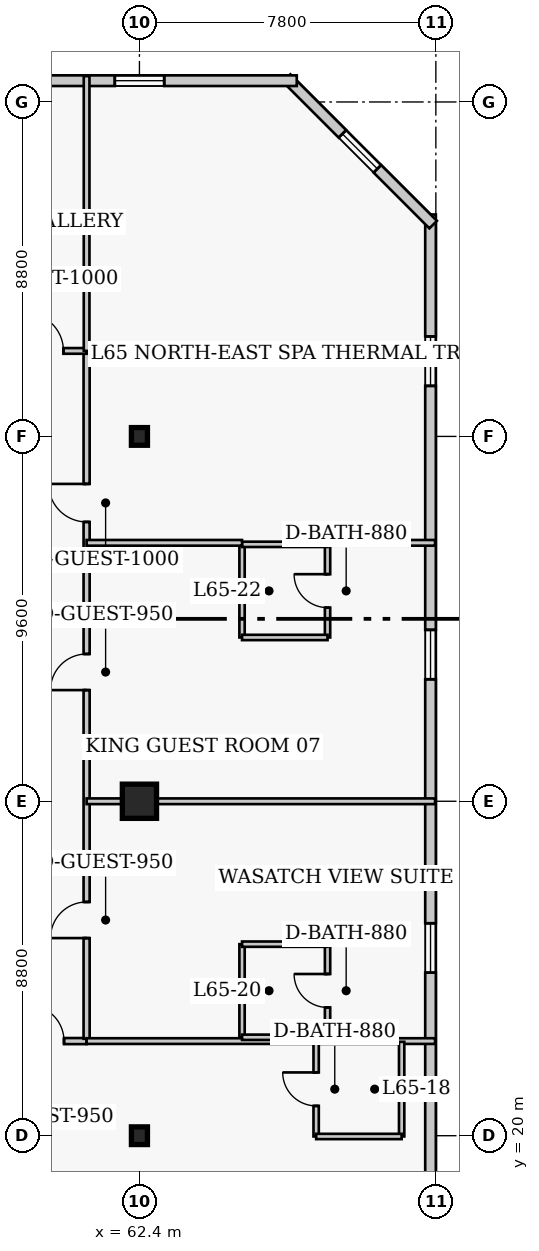
"""IFC4 building model, lengths in metres.
Left out: names, types, materials, properties, quantities, classifications, styles, units other than length and angle.
Written with IfcOpenShell. Run it as: python <this file> out.ifc"""

import sys

from ifc_helpers import new_model, si_unit, direction, frame, frame_2d, origin, origin_2d, place, context, subcontext, project, spatial, rectangle, i_section, extrude, element, fill, save


model = new_model("IFC4")
c1 = context("Model", 3, precision=1e-05, world=origin(), true_north=direction((0.0, 1.0)))
c2 = subcontext(c1, "Body", "Model", "MODEL_VIEW")
j1 = project(units=[si_unit("LENGTHUNIT", "METRE"), si_unit("PLANEANGLEUNIT", "RADIAN")], contexts=[c1])
p1 = place(None, origin())
s1 = spatial("IfcSite", under=j1, at=p1, CompositionType="ELEMENT")
p2 = place(p1, origin())
s2 = spatial("IfcBuilding", under=s1, at=p2, CompositionType="ELEMENT")
p3 = place(p2, frame((0.0, 0.0, 261.4)))
s3 = spatial("IfcBuildingStorey", under=s2, at=p3, CompositionType="ELEMENT", Elevation=261.4)
p4 = place(p3, frame((62.4, 20.0, 0.0), z_axis=(0.0, 0.0, 1.0), x_axis=(1.0, 0.0, 0.0)))
e1 = element("IfcColumn", 1, at=p4, inside=s3, PredefinedType="COLUMN", context=c2, shape_type="SweptSolid", body=[
    extrude(i_section(OverallWidth=0.422, OverallDepth=0.465, WebThickness=0.045, FlangeThickness=0.073, FilletRadius=0.017, at=origin_2d()), origin(), (0.0, 0.0, 1.0), 4.0),
])
p5 = place(p3, frame((62.4, 28.8, 0.0), z_axis=(0.0, 0.0, 1.0), x_axis=(1.0, 0.0, 0.0)))
e2 = element("IfcColumn", 2, at=p5, inside=s3, PredefinedType="COLUMN", context=c2, shape_type="SweptSolid", body=[
    extrude(rectangle(XDim=0.9, YDim=0.9, at=origin_2d()), origin(), (0.0, 0.0, 1.0), 4.0),
])
p6 = place(p3, frame((62.4, 38.4, 0.0), z_axis=(0.0, 0.0, 1.0), x_axis=(1.0, 0.0, 0.0)))
e3 = element("IfcColumn", 3, at=p6, inside=s3, PredefinedType="COLUMN", context=c2, shape_type="SweptSolid", body=[
    extrude(i_section(OverallWidth=0.422, OverallDepth=0.465, WebThickness=0.045, FlangeThickness=0.073, FilletRadius=0.017, at=origin_2d()), origin(), (0.0, 0.0, 1.0), 4.0),
])
p7 = place(p3, frame((70.06, 13.36, 0.0), z_axis=(0.0, 0.0, 1.0), x_axis=(0.0, 1.0, 0.0)))
e4 = element("IfcWall", 4, at=p7, inside=s3, PredefinedType="SOLIDWALL", context=c2, shape_type="SweptSolid", body=[
    extrude(rectangle(XDim=30.88, YDim=0.28, at=frame_2d((15.44, 0.0))), origin(), (0.0, 0.0, 1.0), 3.76),
])
p8 = place(p7, frame((3.21, 0.0, 0.85)))
e5 = element("IfcOpeningElement", 5, at=p8, cuts=e4, PredefinedType="OPENING", context=c2, shape_type="SweptSolid", body=[
    extrude(rectangle(XDim=1.3, YDim=1.7, at=frame_2d((0.65, 0.85))), frame((0.0, 0.15, 0.0), z_axis=(0.0, -1.0, 0.0), x_axis=(1.0, 0.0, 0.0)), (0.0, 0.0, 1.0), 0.3),
])
p9 = place(p7, frame((10.93, 0.0, 0.85)))
e6 = element("IfcOpeningElement", 6, at=p9, cuts=e4, PredefinedType="OPENING", context=c2, shape_type="SweptSolid", body=[
    extrude(rectangle(XDim=1.3, YDim=1.7, at=frame_2d((0.65, 0.85))), frame((0.0, 0.15, 0.0), z_axis=(0.0, -1.0, 0.0), x_axis=(1.0, 0.0, 0.0)), (0.0, 0.0, 1.0), 0.3),
])
p10 = place(p7, frame((18.65, 0.0, 0.85)))
e7 = element("IfcOpeningElement", 7, at=p10, cuts=e4, PredefinedType="OPENING", context=c2, shape_type="SweptSolid", body=[
    extrude(rectangle(XDim=1.3, YDim=1.7, at=frame_2d((0.65, 0.85))), frame((0.0, 0.15, 0.0), z_axis=(0.0, -1.0, 0.0), x_axis=(1.0, 0.0, 0.0)), (0.0, 0.0, 1.0), 0.3),
])
p11 = place(p7, frame((26.37, 0.0, 0.85)))
e8 = element("IfcOpeningElement", 8, at=p11, cuts=e4, PredefinedType="OPENING", context=c2, shape_type="SweptSolid", body=[
    extrude(rectangle(XDim=1.3, YDim=1.7, at=frame_2d((0.65, 0.85))), frame((0.0, 0.15, 0.0), z_axis=(0.0, -1.0, 0.0), x_axis=(1.0, 0.0, 0.0)), (0.0, 0.0, 1.0), 0.3),
])
p12 = place(p3, frame((70.129, 43.973, 0.0), z_axis=(0.0, 0.0, 1.0), x_axis=(-0.707106781187, 0.707106781187, 0.0)))
e9 = element("IfcWall", 9, at=p12, inside=s3, PredefinedType="SOLIDWALL", context=c2, shape_type="SweptSolid", body=[
    extrude(rectangle(XDim=5.454, YDim=0.28, at=frame_2d((2.727, 0.0))), origin(), (0.0, 0.0, 1.0), 3.76),
])
p13 = place(p12, frame((2.077, 0.0, 0.85)))
e10 = element("IfcOpeningElement", 10, at=p13, cuts=e9, PredefinedType="OPENING", context=c2, shape_type="SweptSolid", body=[
    extrude(rectangle(XDim=1.3, YDim=1.7, at=frame_2d((0.65, 0.85))), frame((0.0, 0.15, 0.0), z_axis=(0.0, -1.0, 0.0), x_axis=(1.0, 0.0, 0.0)), (0.0, 0.0, 1.0), 0.3),
])
p14 = place(p3, frame((66.54, 47.76, 0.0), z_axis=(0.0, 0.0, 1.0), x_axis=(-1.0, 0.0, 0.0)))
e11 = element("IfcWall", 11, at=p14, inside=s3, PredefinedType="SOLIDWALL", context=c2, shape_type="SweptSolid", body=[
    extrude(rectangle(XDim=24.83, YDim=0.28, at=frame_2d((12.415, 0.0))), origin(), (0.0, 0.0, 1.0), 3.76),
])
p15 = place(p14, frame((15.14, 0.0, 0.0)))
e12 = element("IfcOpeningElement", 12, at=p15, cuts=e11, PredefinedType="OPENING", context=c2, shape_type="SweptSolid", body=[
    extrude(rectangle(XDim=1.4, YDim=2.15, at=frame_2d((0.7, 1.075))), frame((0.0, 0.15, 0.0), z_axis=(0.0, -1.0, 0.0), x_axis=(1.0, 0.0, 0.0)), (0.0, 0.0, 1.0), 0.3),
])
p16 = place(p14, frame((3.488, 0.0, 0.85)))
e13 = element("IfcOpeningElement", 13, at=p16, cuts=e11, PredefinedType="OPENING", context=c2, shape_type="SweptSolid", body=[
    extrude(rectangle(XDim=1.3, YDim=1.7, at=frame_2d((0.65, 0.85))), frame((0.0, 0.15, 0.0), z_axis=(0.0, -1.0, 0.0), x_axis=(1.0, 0.0, 0.0)), (0.0, 0.0, 1.0), 0.3),
])
p17 = place(p14, frame((12.915, 0.0, 0.85)))
e14 = element("IfcOpeningElement", 14, at=p17, cuts=e11, PredefinedType="OPENING", context=c2, shape_type="SweptSolid", body=[
    extrude(rectangle(XDim=1.3, YDim=1.7, at=frame_2d((0.65, 0.85))), frame((0.0, 0.15, 0.0), z_axis=(0.0, -1.0, 0.0), x_axis=(1.0, 0.0, 0.0)), (0.0, 0.0, 1.0), 0.3),
])
p18 = place(p14, frame((20.692, 0.0, 0.85)))
e15 = element("IfcOpeningElement", 15, at=p18, cuts=e11, PredefinedType="OPENING", context=c2, shape_type="SweptSolid", body=[
    extrude(rectangle(XDim=1.3, YDim=1.7, at=frame_2d((0.65, 0.85))), frame((0.0, 0.15, 0.0), z_axis=(0.0, -1.0, 0.0), x_axis=(1.0, 0.0, 0.0)), (0.0, 0.0, 1.0), 0.3),
])
p19 = place(p3, frame((35.8, 22.49, 0.0), z_axis=(0.0, 0.0, 1.0), x_axis=(1.0, 0.0, 0.0)))
e16 = element("IfcWall", 16, at=p19, inside=s3, PredefinedType="PARTITIONING", context=c2, shape_type="SweptSolid", body=[
    extrude(rectangle(XDim=25.21, YDim=0.16, at=frame_2d((12.605, 0.0))), origin(), (0.0, 0.0, 1.0), 3.76),
])
p20 = place(p19, frame((5.522, 0.0, 0.0)))
e17 = element("IfcOpeningElement", 17, at=p20, cuts=e16, PredefinedType="OPENING", context=c2, shape_type="SweptSolid", body=[
    extrude(rectangle(XDim=1.0, YDim=2.15, at=frame_2d((0.5, 1.075))), frame((0.0, 0.09, 0.0), z_axis=(0.0, -1.0, 0.0), x_axis=(1.0, 0.0, 0.0)), (0.0, 0.0, 1.0), 0.18),
])
p21 = place(p19, frame((18.198, 0.0, 0.0)))
e18 = element("IfcOpeningElement", 18, at=p21, cuts=e16, PredefinedType="OPENING", context=c2, shape_type="SweptSolid", body=[
    extrude(rectangle(XDim=0.95, YDim=2.1, at=frame_2d((0.475, 1.05))), frame((0.0, 0.09, 0.0), z_axis=(0.0, -1.0, 0.0), x_axis=(1.0, 0.0, 0.0)), (0.0, 0.0, 1.0), 0.18),
])
p22 = place(p19, frame((23.665, 0.0, 0.0)))
e19 = element("IfcOpeningElement", 19, at=p22, cuts=e16, PredefinedType="OPENING", context=c2, shape_type="SweptSolid", body=[
    extrude(rectangle(XDim=0.95, YDim=2.1, at=frame_2d((0.475, 1.05))), frame((0.0, 0.09, 0.0), z_axis=(0.0, -1.0, 0.0), x_axis=(1.0, 0.0, 0.0)), (0.0, 0.0, 1.0), 0.18),
])
p23 = place(p3, frame((61.01, 22.55, 0.0), z_axis=(0.0, 0.0, 1.0), x_axis=(0.0, 1.0, 0.0)))
e20 = element("IfcWall", 20, at=p23, inside=s3, PredefinedType="PARTITIONING", context=c2, shape_type="SweptSolid", body=[
    extrude(rectangle(XDim=18.1, YDim=0.16, at=frame_2d((9.05, 0.0))), origin(), (0.0, 0.0, 1.0), 3.76),
])
p24 = place(p23, frame((2.65, 0.0, 0.0)))
e21 = element("IfcOpeningElement", 21, at=p24, cuts=e20, PredefinedType="OPENING", context=c2, shape_type="SweptSolid", body=[
    extrude(rectangle(XDim=0.95, YDim=2.1, at=frame_2d((0.475, 1.05))), frame((0.0, 0.09, 0.0), z_axis=(0.0, -1.0, 0.0), x_axis=(1.0, 0.0, 0.0)), (0.0, 0.0, 1.0), 0.18),
])
p25 = place(p23, frame((9.175, 0.0, 0.0)))
e22 = element("IfcOpeningElement", 22, at=p25, cuts=e20, PredefinedType="OPENING", context=c2, shape_type="SweptSolid", body=[
    extrude(rectangle(XDim=0.95, YDim=2.1, at=frame_2d((0.475, 1.05))), frame((0.0, 0.09, 0.0), z_axis=(0.0, -1.0, 0.0), x_axis=(1.0, 0.0, 0.0)), (0.0, 0.0, 1.0), 0.18),
])
p26 = place(p23, frame((13.6, 0.0, 0.0)))
e23 = element("IfcOpeningElement", 23, at=p26, cuts=e20, PredefinedType="OPENING", context=c2, shape_type="SweptSolid", body=[
    extrude(rectangle(XDim=1.0, YDim=2.15, at=frame_2d((0.5, 1.075))), frame((0.0, 0.09, 0.0), z_axis=(0.0, -1.0, 0.0), x_axis=(1.0, 0.0, 0.0)), (0.0, 0.0, 1.0), 0.18),
])
p27 = place(p3, frame((56.8, 40.65, 0.0), z_axis=(0.0, 0.0, 1.0), x_axis=(1.0, 0.0, 0.0)))
e24 = element("IfcWall", 24, at=p27, inside=s3, PredefinedType="PARTITIONING", context=c2, shape_type="SweptSolid", body=[
    extrude(rectangle(XDim=4.21, YDim=0.15, at=frame_2d((2.105, 0.0))), origin(), (0.0, 0.0, 1.0), 3.76),
])
p28 = place(p27, frame((2.6, 0.0, 0.0)))
e25 = element("IfcOpeningElement", 25, at=p28, cuts=e24, PredefinedType="OPENING", context=c2, shape_type="SweptSolid", body=[
    extrude(rectangle(XDim=1.0, YDim=2.15, at=frame_2d((0.5, 1.075))), frame((0.0, 0.085, 0.0), z_axis=(0.0, -1.0, 0.0), x_axis=(1.0, 0.0, 0.0)), (0.0, 0.0, 1.0), 0.17),
])
p29 = place(p3, frame((61.01, 40.65, 0.0), z_axis=(0.0, 0.0, 1.0), x_axis=(0.0, 1.0, 0.0)))
e26 = element("IfcWall", 26, at=p29, inside=s3, PredefinedType="PARTITIONING", context=c2, shape_type="SweptSolid", body=[
    extrude(rectangle(XDim=7.23, YDim=0.15, at=frame_2d((3.615, 0.0))), origin(), (0.0, 0.0, 1.0), 3.76),
])
p30 = place(p3, frame((61.01, 22.49, 0.0), z_axis=(0.0, 0.0, 1.0), x_axis=(1.0, 0.0, 0.0)))
e27 = element("IfcWall", 27, at=p30, inside=s3, PredefinedType="PARTITIONING", context=c2, shape_type="SweptSolid", body=[
    extrude(rectangle(XDim=9.17, YDim=0.15, at=frame_2d((4.585, 0.0))), origin(), (0.0, 0.0, 1.0), 3.76),
])
p31 = place(p3, frame((67.05, 19.98, 0.0), z_axis=(0.0, 0.0, 1.0), x_axis=(0.0, 1.0, 0.0)))
e28 = element("IfcWall", 28, at=p31, inside=s3, PredefinedType="PLUMBINGWALL", context=c2, shape_type="SweptSolid", body=[
    extrude(rectangle(XDim=2.49, YDim=0.14, at=frame_2d((1.245, 0.0))), origin(), (0.0, 0.0, 1.0), 3.76),
])
p32 = place(p31, frame((0.805, 0.0, 0.0)))
e29 = element("IfcOpeningElement", 29, at=p32, cuts=e28, PredefinedType="OPENING", context=c2, shape_type="SweptSolid", body=[
    extrude(rectangle(XDim=0.88, YDim=2.05, at=frame_2d((0.44, 1.025))), frame((0.0, 0.08, 0.0), z_axis=(0.0, -1.0, 0.0), x_axis=(1.0, 0.0, 0.0)), (0.0, 0.0, 1.0), 0.16),
])
p33 = place(p3, frame((69.3, 19.98, 0.0), z_axis=(0.0, 0.0, 1.0), x_axis=(0.0, 1.0, 0.0)))
e30 = element("IfcWall", 30, at=p33, inside=s3, PredefinedType="PLUMBINGWALL", context=c2, shape_type="SweptSolid", body=[
    extrude(rectangle(XDim=2.49, YDim=0.14, at=frame_2d((1.245, 0.0))), origin(), (0.0, 0.0, 1.0), 3.76),
])
p34 = place(p3, frame((67.05, 19.98, 0.0), z_axis=(0.0, 0.0, 1.0), x_axis=(1.0, 0.0, 0.0)))
e31 = element("IfcWall", 31, at=p34, inside=s3, PredefinedType="PLUMBINGWALL", context=c2, shape_type="SweptSolid", body=[
    extrude(rectangle(XDim=2.25, YDim=0.14, at=frame_2d((1.125, 0.0))), origin(), (0.0, 0.0, 1.0), 3.76),
])
p35 = place(p3, frame((65.1, 22.59, 0.0), z_axis=(0.0, 0.0, 1.0), x_axis=(0.0, 1.0, 0.0)))
e32 = element("IfcWall", 32, at=p35, inside=s3, PredefinedType="PLUMBINGWALL", context=c2, shape_type="SweptSolid", body=[
    extrude(rectangle(XDim=2.45, YDim=0.14, at=frame_2d((1.225, 0.0))), origin(), (0.0, 0.0, 1.0), 3.76),
])
p36 = place(p3, frame((67.35, 22.59, 0.0), z_axis=(0.0, 0.0, 1.0), x_axis=(0.0, 1.0, 0.0)))
e33 = element("IfcWall", 33, at=p36, inside=s3, PredefinedType="PLUMBINGWALL", context=c2, shape_type="SweptSolid", body=[
    extrude(rectangle(XDim=2.45, YDim=0.14, at=frame_2d((1.225, 0.0))), origin(), (0.0, 0.0, 1.0), 3.76),
])
p37 = place(p36, frame((0.785, 0.0, 0.0)))
e34 = element("IfcOpeningElement", 34, at=p37, cuts=e33, PredefinedType="OPENING", context=c2, shape_type="SweptSolid", body=[
    extrude(rectangle(XDim=0.88, YDim=2.05, at=frame_2d((0.44, 1.025))), frame((0.0, 0.08, 0.0), z_axis=(0.0, -1.0, 0.0), x_axis=(1.0, 0.0, 0.0)), (0.0, 0.0, 1.0), 0.16),
])
for number, where, z_axis, x_axis in (
    (35, (65.1, 22.59, 0.0), (0.0, 0.0, 1.0), (1.0, 0.0, 0.0)),
    (36, (65.1, 25.04, 0.0), (0.0, 0.0, 1.0), (1.0, 0.0, 0.0)),
):
    element("IfcWall", number, at=place(p3, frame(where, z_axis=z_axis, x_axis=x_axis)), inside=s3, PredefinedType="PLUMBINGWALL", context=c2, shape_type="SweptSolid", body=[
        extrude(rectangle(XDim=2.25, YDim=0.14, at=frame_2d((1.125, 0.0))), origin(), (0.0, 0.0, 1.0), 3.76),
    ])
p38 = place(p3, frame((61.01, 28.8, 0.0), z_axis=(0.0, 0.0, 1.0), x_axis=(1.0, 0.0, 0.0)))
e37 = element("IfcWall", 37, at=p38, inside=s3, PredefinedType="PARTITIONING", context=c2, shape_type="SweptSolid", body=[
    extrude(rectangle(XDim=9.17, YDim=0.15, at=frame_2d((4.585, 0.0))), origin(), (0.0, 0.0, 1.0), 3.064),
])
p39 = place(p3, frame((65.1, 33.11, 0.0), z_axis=(0.0, 0.0, 1.0), x_axis=(0.0, 1.0, 0.0)))
e38 = element("IfcWall", 38, at=p39, inside=s3, PredefinedType="PLUMBINGWALL", context=c2, shape_type="SweptSolid", body=[
    extrude(rectangle(XDim=2.45, YDim=0.14, at=frame_2d((1.225, 0.0))), origin(), (0.0, 0.0, 1.0), 3.76),
])
p40 = place(p3, frame((67.35, 33.11, 0.0), z_axis=(0.0, 0.0, 1.0), x_axis=(0.0, 1.0, 0.0)))
e39 = element("IfcWall", 39, at=p40, inside=s3, PredefinedType="PLUMBINGWALL", context=c2, shape_type="SweptSolid", body=[
    extrude(rectangle(XDim=2.45, YDim=0.14, at=frame_2d((1.225, 0.0))), origin(), (0.0, 0.0, 1.0), 3.76),
])
p41 = place(p40, frame((0.785, 0.0, 0.0)))
e40 = element("IfcOpeningElement", 40, at=p41, cuts=e39, PredefinedType="OPENING", context=c2, shape_type="SweptSolid", body=[
    extrude(rectangle(XDim=0.88, YDim=2.05, at=frame_2d((0.44, 1.025))), frame((0.0, 0.08, 0.0), z_axis=(0.0, -1.0, 0.0), x_axis=(1.0, 0.0, 0.0)), (0.0, 0.0, 1.0), 0.16),
])
for number, where, z_axis, x_axis in (
    (41, (65.1, 33.11, 0.0), (0.0, 0.0, 1.0), (1.0, 0.0, 0.0)),
    (42, (65.1, 35.56, 0.0), (0.0, 0.0, 1.0), (1.0, 0.0, 0.0)),
):
    element("IfcWall", number, at=place(p3, frame(where, z_axis=z_axis, x_axis=x_axis)), inside=s3, PredefinedType="PLUMBINGWALL", context=c2, shape_type="SweptSolid", body=[
        extrude(rectangle(XDim=2.25, YDim=0.14, at=frame_2d((1.125, 0.0))), origin(), (0.0, 0.0, 1.0), 3.76),
    ])
p42 = place(p3, frame((61.01, 35.6, 0.0), z_axis=(0.0, 0.0, 1.0), x_axis=(1.0, 0.0, 0.0)))
e43 = element("IfcWall", 43, at=p42, inside=s3, PredefinedType="PARTITIONING", context=c2, shape_type="SweptSolid", body=[
    extrude(rectangle(XDim=4.09, YDim=0.15, at=frame_2d((2.045, 0.0))), origin(), (0.0, 0.0, 1.0), 3.76),
])
p43 = place(p3, frame((67.35, 35.6, 0.0), z_axis=(0.0, 0.0, 1.0), x_axis=(1.0, 0.0, 0.0)))
e44 = element("IfcWall", 44, at=p43, inside=s3, PredefinedType="PARTITIONING", context=c2, shape_type="SweptSolid", body=[
    extrude(rectangle(XDim=2.83, YDim=0.15, at=frame_2d((1.415, 0.0))), origin(), (0.0, 0.0, 1.0), 3.76),
])
p44 = place(p9, origin())
e45 = element("IfcWindow", 45, at=p44, inside=s3, PartitioningType="SINGLE_PANEL", PredefinedType="WINDOW", context=c2, shape_type="SweptSolid", body=[
    extrude(rectangle(XDim=1.3, YDim=1.7, at=frame_2d((0.65, 0.85))), frame((0.0, 0.03, 0.0), z_axis=(0.0, -1.0, 0.0), x_axis=(1.0, 0.0, 0.0)), (0.0, 0.0, 1.0), 0.06),
])
fill(e6, e45)
p45 = place(p10, origin())
e46 = element("IfcWindow", 46, at=p45, inside=s3, PartitioningType="SINGLE_PANEL", PredefinedType="WINDOW", context=c2, shape_type="SweptSolid", body=[
    extrude(rectangle(XDim=1.3, YDim=1.7, at=frame_2d((0.65, 0.85))), frame((0.0, 0.03, 0.0), z_axis=(0.0, -1.0, 0.0), x_axis=(1.0, 0.0, 0.0)), (0.0, 0.0, 1.0), 0.06),
])
fill(e7, e46)
p46 = place(p11, origin())
e47 = element("IfcWindow", 47, at=p46, inside=s3, PartitioningType="SINGLE_PANEL", PredefinedType="WINDOW", context=c2, shape_type="SweptSolid", body=[
    extrude(rectangle(XDim=1.3, YDim=1.7, at=frame_2d((0.65, 0.85))), frame((0.0, 0.03, 0.0), z_axis=(0.0, -1.0, 0.0), x_axis=(1.0, 0.0, 0.0)), (0.0, 0.0, 1.0), 0.06),
])
fill(e8, e47)
p47 = place(p13, origin())
e48 = element("IfcWindow", 48, at=p47, inside=s3, PartitioningType="SINGLE_PANEL", PredefinedType="WINDOW", context=c2, shape_type="SweptSolid", body=[
    extrude(rectangle(XDim=1.3, YDim=1.7, at=frame_2d((0.65, 0.85))), frame((0.0, 0.03, 0.0), z_axis=(0.0, -1.0, 0.0), x_axis=(1.0, 0.0, 0.0)), (0.0, 0.0, 1.0), 0.06),
])
fill(e10, e48)
p48 = place(p16, origin())
e49 = element("IfcWindow", 49, at=p48, inside=s3, PartitioningType="SINGLE_PANEL", PredefinedType="WINDOW", context=c2, shape_type="SweptSolid", body=[
    extrude(rectangle(XDim=1.3, YDim=1.7, at=frame_2d((0.65, 0.85))), frame((0.0, 0.03, 0.0), z_axis=(0.0, -1.0, 0.0), x_axis=(1.0, 0.0, 0.0)), (0.0, 0.0, 1.0), 0.06),
])
fill(e13, e49)
p49 = place(p28, origin())
e50 = element("IfcDoor", 50, at=p49, inside=s3, OperationType="SINGLE_SWING_LEFT", PredefinedType="DOOR", context=c2, shape_type="SweptSolid", body=[
    extrude(rectangle(XDim=1.0, YDim=2.15, at=frame_2d((0.5, 1.075))), frame((0.0, 0.025, 0.0), z_axis=(0.0, -1.0, 0.0), x_axis=(1.0, 0.0, 0.0)), (0.0, 0.0, 1.0), 0.05),
])
fill(e25, e50)
p50 = place(p32, origin())
e51 = element("IfcDoor", 51, at=p50, inside=s3, OperationType="SINGLE_SWING_RIGHT", PredefinedType="DOOR", context=c2, shape_type="SweptSolid", body=[
    extrude(rectangle(XDim=0.88, YDim=2.05, at=frame_2d((0.44, 1.025))), frame((0.0, 0.025, 0.0), z_axis=(0.0, -1.0, 0.0), x_axis=(1.0, 0.0, 0.0)), (0.0, 0.0, 1.0), 0.05),
])
fill(e29, e51)
p51 = place(p22, origin())
e52 = element("IfcDoor", 52, at=p51, inside=s3, OperationType="SINGLE_SWING_LEFT", PredefinedType="DOOR", context=c2, shape_type="SweptSolid", body=[
    extrude(rectangle(XDim=0.95, YDim=2.1, at=frame_2d((0.475, 1.05))), frame((0.0, 0.025, 0.0), z_axis=(0.0, -1.0, 0.0), x_axis=(1.0, 0.0, 0.0)), (0.0, 0.0, 1.0), 0.05),
])
fill(e19, e52)
p52 = place(p37, origin())
e53 = element("IfcDoor", 53, at=p52, inside=s3, OperationType="SINGLE_SWING_RIGHT", PredefinedType="DOOR", context=c2, shape_type="SweptSolid", body=[
    extrude(rectangle(XDim=0.88, YDim=2.05, at=frame_2d((0.44, 1.025))), frame((0.0, 0.025, 0.0), z_axis=(0.0, -1.0, 0.0), x_axis=(1.0, 0.0, 0.0)), (0.0, 0.0, 1.0), 0.05),
])
fill(e34, e53)
p53 = place(p24, origin())
e54 = element("IfcDoor", 54, at=p53, inside=s3, OperationType="SINGLE_SWING_LEFT", PredefinedType="DOOR", context=c2, shape_type="SweptSolid", body=[
    extrude(rectangle(XDim=0.95, YDim=2.1, at=frame_2d((0.475, 1.05))), frame((0.0, 0.025, 0.0), z_axis=(0.0, -1.0, 0.0), x_axis=(1.0, 0.0, 0.0)), (0.0, 0.0, 1.0), 0.05),
])
fill(e21, e54)
p54 = place(p41, origin())
e55 = element("IfcDoor", 55, at=p54, inside=s3, OperationType="SINGLE_SWING_RIGHT", PredefinedType="DOOR", context=c2, shape_type="SweptSolid", body=[
    extrude(rectangle(XDim=0.88, YDim=2.05, at=frame_2d((0.44, 1.025))), frame((0.0, 0.025, 0.0), z_axis=(0.0, -1.0, 0.0), x_axis=(1.0, 0.0, 0.0)), (0.0, 0.0, 1.0), 0.05),
])
fill(e40, e55)
p55 = place(p25, origin())
e56 = element("IfcDoor", 56, at=p55, inside=s3, OperationType="SINGLE_SWING_LEFT", PredefinedType="DOOR", context=c2, shape_type="SweptSolid", body=[
    extrude(rectangle(XDim=0.95, YDim=2.1, at=frame_2d((0.475, 1.05))), frame((0.0, 0.025, 0.0), z_axis=(0.0, -1.0, 0.0), x_axis=(1.0, 0.0, 0.0)), (0.0, 0.0, 1.0), 0.05),
])
fill(e22, e56)
p56 = place(p26, origin())
e57 = element("IfcDoor", 57, at=p56, inside=s3, OperationType="SINGLE_SWING_RIGHT", PredefinedType="DOOR", context=c2, shape_type="SweptSolid", body=[
    extrude(rectangle(XDim=1.0, YDim=2.15, at=frame_2d((0.5, 1.075))), frame((0.0, 0.025, 0.0), z_axis=(0.0, -1.0, 0.0), x_axis=(1.0, 0.0, 0.0)), (0.0, 0.0, 1.0), 0.05),
])
fill(e23, e57)
save(model, sys.argv[1])
